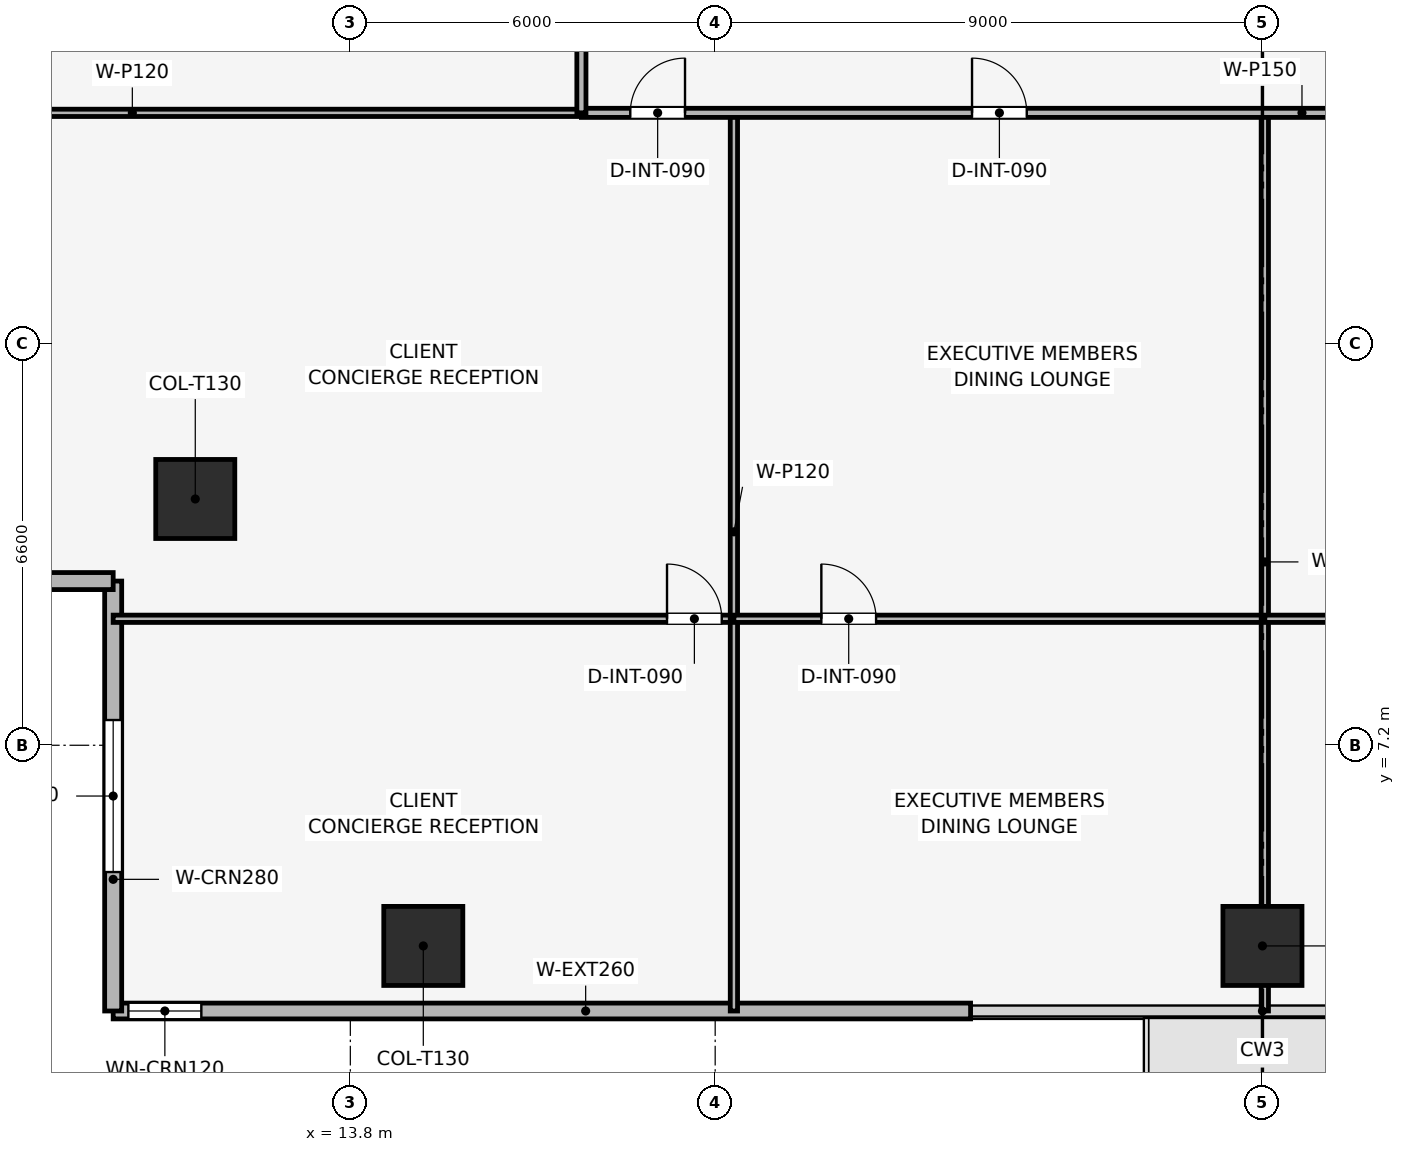
"""IFC4 building model, lengths in metres.
Left out: names, types, materials, properties, quantities, classifications, styles, units other than length and angle.
Written with IfcOpenShell. Run it as: python <this file> out.ifc"""

import sys

from ifc_helpers import new_model, si_unit, direction, frame, frame_2d, origin, origin_2d, place, context, subcontext, project, spatial, rectangle, extrude, element, fill, save


model = new_model("IFC4")
c1 = context("Model", 3, precision=1e-05, world=origin(), true_north=direction((0.0, 1.0)))
c2 = subcontext(c1, "Body", "Model", "MODEL_VIEW")
j1 = project(units=[si_unit("LENGTHUNIT", "METRE"), si_unit("PLANEANGLEUNIT", "RADIAN")], contexts=[c1])
p1 = place(None, origin())
s1 = spatial("IfcSite", under=j1, at=p1, CompositionType="ELEMENT")
p2 = place(p1, origin())
s2 = spatial("IfcBuilding", under=s1, at=p2, CompositionType="ELEMENT")
p3 = place(p2, frame((0.0, 0.0, 121.2)))
s3 = spatial("IfcBuildingStorey", under=s2, at=p3, CompositionType="ELEMENT", Elevation=121.2)
for number, where, z_axis, x_axis in (
    (1, (15.0, 3.9, 0.003), (0.0, 0.0, 1.0), (1.0, 0.0, 0.0)),
    (2, (28.8, 3.9, 0.003), (0.0, 0.0, 1.0), (1.0, 0.0, 0.0)),
    (3, (11.25, 11.25, 0.003), (0.0, 0.0, 1.0), (1.0, 0.0, 0.0)),
):
    element("IfcColumn", number, at=place(p3, frame(where, z_axis=z_axis, x_axis=x_axis)), inside=s3, PredefinedType="COLUMN", context=c2, shape_type="SweptSolid", body=[
        extrude(rectangle(XDim=1.3, YDim=1.3, at=origin_2d()), origin(), (0.0, 0.0, 1.0), 3.644),
    ])
p4 = place(p3, frame((24.0, 2.83, 0.0), z_axis=(0.0, 0.0, 1.0), x_axis=(-1.0, 0.0, 0.0)))
e4 = element("IfcWall", 4, at=p4, inside=s3, PredefinedType="SOLIDWALL", context=c2, shape_type="SweptSolid", body=[
    extrude(rectangle(XDim=14.1, YDim=0.26, at=frame_2d((7.05, 0.0))), origin(), (0.0, 0.0, 1.0), 3.65),
])
p5 = place(p4, frame((12.65, 0.0, 0.9)))
e5 = element("IfcOpeningElement", 5, at=p5, cuts=e4, PredefinedType="OPENING", context=c2, shape_type="SweptSolid", body=[
    extrude(rectangle(XDim=1.2, YDim=2.1, at=frame_2d((0.6, 1.05))), frame((0.0, 0.14, 0.0), z_axis=(0.0, -1.0, 0.0), x_axis=(1.0, 0.0, 0.0)), (0.0, 0.0, 1.0), 0.28),
])
p6 = place(p3, frame((9.9, 2.83, 0.0), z_axis=(0.0, 0.0, 1.0), x_axis=(0.0, 1.0, 0.0)))
e6 = element("IfcWall", 6, at=p6, inside=s3, PredefinedType="SOLIDWALL", context=c2, shape_type="SweptSolid", body=[
    extrude(rectangle(XDim=7.07, YDim=0.28, at=frame_2d((3.535, 0.0))), origin(), (0.0, 0.0, 1.0), 3.65),
])
p7 = place(p6, frame((2.285, 0.0, 0.9)))
e7 = element("IfcOpeningElement", 7, at=p7, cuts=e6, PredefinedType="OPENING", context=c2, shape_type="SweptSolid", body=[
    extrude(rectangle(XDim=2.5, YDim=1.9, at=frame_2d((1.25, 0.95))), frame((0.0, 0.15, 0.0), z_axis=(0.0, -1.0, 0.0), x_axis=(1.0, 0.0, 0.0)), (0.0, 0.0, 1.0), 0.3),
])
p8 = place(p3, frame((9.9, 9.9, 0.0), z_axis=(0.0, 0.0, 1.0), x_axis=(-1.0, 0.0, 0.0)))
e8 = element("IfcWall", 8, at=p8, inside=s3, PredefinedType="SOLIDWALL", context=c2, shape_type="SweptSolid", body=[
    extrude(rectangle(XDim=7.07, YDim=0.28, at=frame_2d((3.535, 0.0))), origin(), (0.0, 0.0, 1.0), 3.65),
])
p9 = place(p8, frame((2.285, 0.0, 0.9)))
e9 = element("IfcOpeningElement", 9, at=p9, cuts=e8, PredefinedType="OPENING", context=c2, shape_type="SweptSolid", body=[
    extrude(rectangle(XDim=2.5, YDim=1.9, at=frame_2d((1.25, 0.95))), frame((0.0, 0.15, 0.0), z_axis=(0.0, -1.0, 0.0), x_axis=(1.0, 0.0, 0.0)), (0.0, 0.0, 1.0), 0.3),
])
p10 = place(p3, frame((9.9, 9.28, 0.0), z_axis=(0.0, 0.0, 1.0), x_axis=(1.0, 0.0, 0.0)))
e10 = element("IfcWall", 10, at=p10, inside=s3, PredefinedType="PARTITIONING", context=c2, shape_type="SweptSolid", body=[
    extrude(rectangle(XDim=10.208, YDim=0.12, at=frame_2d((5.104, 0.0))), origin(), (0.0, 0.0, 1.0), 3.035),
])
p11 = place(p10, frame((9.108, 0.0, 0.0)))
e11 = element("IfcOpeningElement", 11, at=p11, cuts=e10, PredefinedType="OPENING", context=c2, shape_type="SweptSolid", body=[
    extrude(rectangle(XDim=0.9, YDim=2.1, at=frame_2d((0.45, 1.05))), frame((0.0, 0.07, 0.0), z_axis=(0.0, -1.0, 0.0), x_axis=(1.0, 0.0, 0.0)), (0.0, 0.0, 1.0), 0.14),
])
p12 = place(p3, frame((20.108, 2.83, 0.0), z_axis=(0.0, 0.0, 1.0), x_axis=(0.0, 1.0, 0.0)))
e12 = element("IfcWall", 12, at=p12, inside=s3, PredefinedType="PARTITIONING", context=c2, shape_type="SweptSolid", body=[
    extrude(rectangle(XDim=14.77, YDim=0.12, at=frame_2d((7.385, 0.0))), origin(), (0.0, 0.0, 1.0), 3.035),
])
p13 = place(p3, frame((20.108, 9.28, 0.0), z_axis=(0.0, 0.0, 1.0), x_axis=(1.0, 0.0, 0.0)))
e13 = element("IfcWall", 13, at=p13, inside=s3, PredefinedType="PARTITIONING", context=c2, shape_type="SweptSolid", body=[
    extrude(rectangle(XDim=8.731, YDim=0.12, at=frame_2d((4.366, 0.0))), origin(), (0.0, 0.0, 1.0), 3.185),
])
p14 = place(p13, frame((1.438, 0.0, 0.0)))
e14 = element("IfcOpeningElement", 14, at=p14, cuts=e13, PredefinedType="OPENING", context=c2, shape_type="SweptSolid", body=[
    extrude(rectangle(XDim=0.9, YDim=2.1, at=frame_2d((0.45, 1.05))), frame((0.0, 0.07, 0.0), z_axis=(0.0, -1.0, 0.0), x_axis=(1.0, 0.0, 0.0)), (0.0, 0.0, 1.0), 0.14),
])
p15 = place(p3, frame((28.839, 2.83, 0.0), z_axis=(0.0, 0.0, 1.0), x_axis=(0.0, 1.0, 0.0)))
e15 = element("IfcWall", 15, at=p15, inside=s3, PredefinedType="PARTITIONING", context=c2, shape_type="SweptSolid", body=[
    extrude(rectangle(XDim=14.77, YDim=0.12, at=frame_2d((7.385, 0.0))), origin(), (0.0, 0.0, 1.0), 3.135),
])
p16 = place(p3, frame((28.839, 9.28, 0.0), z_axis=(0.0, 0.0, 1.0), x_axis=(1.0, 0.0, 0.0)))
e16 = element("IfcWall", 16, at=p16, inside=s3, PredefinedType="PARTITIONING", context=c2, shape_type="SweptSolid", body=[
    extrude(rectangle(XDim=18.861, YDim=0.12, at=frame_2d((9.43, 0.0))), origin(), (0.0, 0.0, 1.0), 3.035),
])
p17 = place(p16, frame((6.054, 0.0, 0.0)))
e17 = element("IfcOpeningElement", 17, at=p17, cuts=e16, PredefinedType="OPENING", context=c2, shape_type="SweptSolid", body=[
    extrude(rectangle(XDim=0.9, YDim=2.1, at=frame_2d((0.45, 1.05))), frame((0.0, 0.07, 0.0), z_axis=(0.0, -1.0, 0.0), x_axis=(1.0, 0.0, 0.0)), (0.0, 0.0, 1.0), 0.14),
])
p18 = place(p3, frame((2.83, 17.6, 0.0), z_axis=(0.0, 0.0, 1.0), x_axis=(1.0, 0.0, 0.0)))
e18 = element("IfcWall", 18, at=p18, inside=s3, PredefinedType="PARTITIONING", context=c2, shape_type="SweptSolid", body=[
    extrude(rectangle(XDim=14.77, YDim=0.12, at=frame_2d((7.385, 0.0))), origin(), (0.0, 0.0, 1.0), 3.035),
])
p19 = place(p3, frame((17.6, 17.6, 0.0), z_axis=(0.0, 0.0, 1.0), x_axis=(1.0, 0.0, 0.0)))
e19 = element("IfcWall", 19, at=p19, inside=s3, PredefinedType="PARTITIONING", context=c2, shape_type="SweptSolid", body=[
    extrude(rectangle(XDim=22.4, YDim=0.15, at=frame_2d((11.2, 0.0))), origin(), (0.0, 0.0, 1.0), 3.185),
])
p20 = place(p19, frame((0.804, 0.0, 0.0)))
e20 = element("IfcOpeningElement", 20, at=p20, cuts=e19, PredefinedType="OPENING", context=c2, shape_type="SweptSolid", body=[
    extrude(rectangle(XDim=0.9, YDim=2.1, at=frame_2d((0.45, 1.05))), frame((0.0, 0.085, 0.0), z_axis=(0.0, -1.0, 0.0), x_axis=(1.0, 0.0, 0.0)), (0.0, 0.0, 1.0), 0.17),
])
p21 = place(p19, frame((6.424, 0.0, 0.0)))
e21 = element("IfcOpeningElement", 21, at=p21, cuts=e19, PredefinedType="OPENING", context=c2, shape_type="SweptSolid", body=[
    extrude(rectangle(XDim=0.9, YDim=2.1, at=frame_2d((0.45, 1.05))), frame((0.0, 0.085, 0.0), z_axis=(0.0, -1.0, 0.0), x_axis=(1.0, 0.0, 0.0)), (0.0, 0.0, 1.0), 0.17),
])
p22 = place(p19, frame((16.369, 0.0, 0.0)))
e22 = element("IfcOpeningElement", 22, at=p22, cuts=e19, PredefinedType="OPENING", context=c2, shape_type="SweptSolid", body=[
    extrude(rectangle(XDim=0.9, YDim=2.1, at=frame_2d((0.45, 1.05))), frame((0.0, 0.085, 0.0), z_axis=(0.0, -1.0, 0.0), x_axis=(1.0, 0.0, 0.0)), (0.0, 0.0, 1.0), 0.17),
])
p23 = place(p3, frame((17.6, 17.6, 0.0), z_axis=(0.0, 0.0, 1.0), x_axis=(0.0, 1.0, 0.0)))
e23 = element("IfcWall", 23, at=p23, inside=s3, PredefinedType="PARTITIONING", context=c2, shape_type="SweptSolid", body=[
    extrude(rectangle(XDim=22.4, YDim=0.15, at=frame_2d((11.2, 0.0))), origin(), (0.0, 0.0, 1.0), 3.185),
])
p24 = place(p23, frame((1.95, 0.0, 0.0)))
e24 = element("IfcOpeningElement", 24, at=p24, cuts=e23, PredefinedType="OPENING", context=c2, shape_type="SweptSolid", body=[
    extrude(rectangle(XDim=0.9, YDim=2.1, at=frame_2d((0.45, 1.05))), frame((0.0, 0.085, 0.0), z_axis=(0.0, -1.0, 0.0), x_axis=(1.0, 0.0, 0.0)), (0.0, 0.0, 1.0), 0.17),
])
p25 = place(p23, frame((5.75, 0.0, 0.0)))
e25 = element("IfcOpeningElement", 25, at=p25, cuts=e23, PredefinedType="OPENING", context=c2, shape_type="SweptSolid", body=[
    extrude(rectangle(XDim=0.9, YDim=2.1, at=frame_2d((0.45, 1.05))), frame((0.0, 0.085, 0.0), z_axis=(0.0, -1.0, 0.0), x_axis=(1.0, 0.0, 0.0)), (0.0, 0.0, 1.0), 0.17),
])
p26 = place(p23, frame((8.65, 0.0, 0.0)))
e26 = element("IfcOpeningElement", 26, at=p26, cuts=e23, PredefinedType="OPENING", context=c2, shape_type="SweptSolid", body=[
    extrude(rectangle(XDim=0.9, YDim=2.1, at=frame_2d((0.45, 1.05))), frame((0.0, 0.085, 0.0), z_axis=(0.0, -1.0, 0.0), x_axis=(1.0, 0.0, 0.0)), (0.0, 0.0, 1.0), 0.17),
])
p27 = place(p23, frame((11.4, 0.0, 0.0)))
e27 = element("IfcOpeningElement", 27, at=p27, cuts=e23, PredefinedType="OPENING", context=c2, shape_type="SweptSolid", body=[
    extrude(rectangle(XDim=0.95, YDim=2.1, at=frame_2d((0.475, 1.05))), frame((0.0, 0.085, 0.0), z_axis=(0.0, -1.0, 0.0), x_axis=(1.0, 0.0, 0.0)), (0.0, 0.0, 1.0), 0.17),
])
p28 = place(p23, frame((17.35, 0.0, 0.0)))
e28 = element("IfcOpeningElement", 28, at=p28, cuts=e23, PredefinedType="OPENING", context=c2, shape_type="SweptSolid", body=[
    extrude(rectangle(XDim=0.9, YDim=2.1, at=frame_2d((0.45, 1.05))), frame((0.0, 0.085, 0.0), z_axis=(0.0, -1.0, 0.0), x_axis=(1.0, 0.0, 0.0)), (0.0, 0.0, 1.0), 0.17),
])
p29 = place(p5, origin())
e29 = element("IfcWindow", 29, at=p29, inside=s3, PartitioningType="SINGLE_PANEL", PredefinedType="WINDOW", context=c2, shape_type="SweptSolid", body=[
    extrude(rectangle(XDim=1.2, YDim=2.1, at=frame_2d((0.6, 1.05))), frame((0.0, 0.03, 0.0), z_axis=(0.0, -1.0, 0.0), x_axis=(1.0, 0.0, 0.0)), (0.0, 0.0, 1.0), 0.06),
])
fill(e5, e29)
p30 = place(p7, origin())
e30 = element("IfcWindow", 30, at=p30, inside=s3, PartitioningType="SINGLE_PANEL", PredefinedType="WINDOW", context=c2, shape_type="SweptSolid", body=[
    extrude(rectangle(XDim=2.5, YDim=1.9, at=frame_2d((1.25, 0.95))), frame((0.0, 0.03, 0.0), z_axis=(0.0, -1.0, 0.0), x_axis=(1.0, 0.0, 0.0)), (0.0, 0.0, 1.0), 0.06),
])
fill(e7, e30)
p31 = place(p11, origin())
e31 = element("IfcDoor", 31, at=p31, inside=s3, OperationType="SINGLE_SWING_LEFT", PredefinedType="DOOR", context=c2, shape_type="SweptSolid", body=[
    extrude(rectangle(XDim=0.9, YDim=2.1, at=frame_2d((0.45, 1.05))), frame((0.0, 0.025, 0.0), z_axis=(0.0, -1.0, 0.0), x_axis=(1.0, 0.0, 0.0)), (0.0, 0.0, 1.0), 0.05),
])
fill(e11, e31)
p32 = place(p14, origin())
e32 = element("IfcDoor", 32, at=p32, inside=s3, OperationType="SINGLE_SWING_LEFT", PredefinedType="DOOR", context=c2, shape_type="SweptSolid", body=[
    extrude(rectangle(XDim=0.9, YDim=2.1, at=frame_2d((0.45, 1.05))), frame((0.0, 0.025, 0.0), z_axis=(0.0, -1.0, 0.0), x_axis=(1.0, 0.0, 0.0)), (0.0, 0.0, 1.0), 0.05),
])
fill(e14, e32)
p33 = place(p20, origin())
e33 = element("IfcDoor", 33, at=p33, inside=s3, OperationType="SINGLE_SWING_RIGHT", PredefinedType="DOOR", context=c2, shape_type="SweptSolid", body=[
    extrude(rectangle(XDim=0.9, YDim=2.1, at=frame_2d((0.45, 1.05))), frame((0.0, 0.025, 0.0), z_axis=(0.0, -1.0, 0.0), x_axis=(1.0, 0.0, 0.0)), (0.0, 0.0, 1.0), 0.05),
])
fill(e20, e33)
p34 = place(p21, origin())
e34 = element("IfcDoor", 34, at=p34, inside=s3, OperationType="SINGLE_SWING_LEFT", PredefinedType="DOOR", context=c2, shape_type="SweptSolid", body=[
    extrude(rectangle(XDim=0.9, YDim=2.1, at=frame_2d((0.45, 1.05))), frame((0.0, 0.025, 0.0), z_axis=(0.0, -1.0, 0.0), x_axis=(1.0, 0.0, 0.0)), (0.0, 0.0, 1.0), 0.05),
])
fill(e21, e34)
save(model, sys.argv[1])
